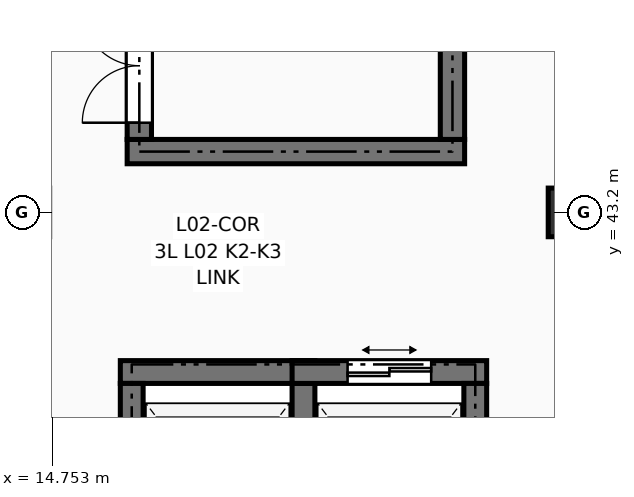
"""IFC4 building model, lengths in metres.
Left out: names, types, materials, properties, quantities, classifications, styles, units other than length and angle.
Written with IfcOpenShell. Run it as: python <this file> out.ifc"""

import sys

from ifc_helpers import new_model, si_unit, direction, frame, frame_2d, origin, origin_2d, place, context, subcontext, project, spatial, rectangle, extrude, element, fill, save


model = new_model("IFC4")
c1 = context("Model", 3, precision=1e-05, world=origin(), true_north=direction((0.0, 1.0)))
c2 = subcontext(c1, "Body", "Model", "MODEL_VIEW")
j1 = project(units=[si_unit("LENGTHUNIT", "METRE"), si_unit("PLANEANGLEUNIT", "RADIAN")], contexts=[c1])
p1 = place(None, origin())
s1 = spatial("IfcSite", under=j1, at=p1, CompositionType="ELEMENT")
p2 = place(p1, origin())
s2 = spatial("IfcBuilding", under=s1, at=p2, CompositionType="ELEMENT")
p3 = place(p2, frame((0.0, 0.0, 8.55)))
s3 = spatial("IfcBuildingStorey", under=s2, at=p3, CompositionType="ELEMENT", Elevation=8.55)
p4 = place(p3, frame((21.6, 43.2, 0.0), z_axis=(0.0, 0.0, 1.0), x_axis=(1.0, 0.0, 0.0)))
e1 = element("IfcColumn", 1, at=p4, inside=s3, PredefinedType="COLUMN", context=c2, shape_type="SweptSolid", body=[
    extrude(rectangle(XDim=0.64, YDim=0.64, at=origin_2d()), origin(), (0.0, 0.0, 1.0), 3.6),
])
p5 = place(p3, frame((15.74, 44.0, 0.0), z_axis=(0.0, 0.0, 1.0), x_axis=(1.0, 0.0, 0.0)))
e2 = element("IfcWall", 2, at=p5, inside=s3, PredefinedType="SHEAR", context=c2, shape_type="SweptSolid", body=[
    extrude(rectangle(XDim=4.44, YDim=0.32, at=frame_2d((2.22, 0.0))), origin(), (0.0, 0.0, 1.0), 3.39),
])
p6 = place(p3, frame((15.9, 44.16, 0.0), z_axis=(0.0, 0.0, 1.0), x_axis=(0.0, 1.0, 0.0)))
e3 = element("IfcWall", 3, at=p6, inside=s3, PredefinedType="SHEAR", context=c2, shape_type="SweptSolid", body=[
    extrude(rectangle(XDim=7.28, YDim=0.32, at=frame_2d((3.64, 0.0))), origin(), (0.0, 0.0, 1.0), 3.39),
])
p7 = place(p6, frame((0.22, 0.0, 0.0)))
e4 = element("IfcOpeningElement", 4, at=p7, cuts=e3, PredefinedType="OPENING", context=c2, shape_type="SweptSolid", body=[
    extrude(rectangle(XDim=1.5, YDim=2.2, at=frame_2d((0.75, 1.1))), frame((0.0, 0.172, 0.0), z_axis=(0.0, -1.0, 0.0), x_axis=(1.0, 0.0, 0.0)), (0.0, 0.0, 1.0), 0.344),
])
p8 = place(p3, frame((20.02, 44.16, 0.0), z_axis=(0.0, 0.0, 1.0), x_axis=(0.0, 1.0, 0.0)))
e5 = element("IfcWall", 5, at=p8, inside=s3, PredefinedType="SHEAR", context=c2, shape_type="SweptSolid", body=[
    extrude(rectangle(XDim=7.28, YDim=0.32, at=frame_2d((3.64, 0.0))), origin(), (0.0, 0.0, 1.0), 3.39),
])
p9 = place(p3, frame((15.65, 41.1, 0.0), z_axis=(0.0, 0.0, 1.0), x_axis=(1.0, 0.0, 0.0)))
e6 = element("IfcWall", 6, at=p9, inside=s3, PredefinedType="SHEAR", context=c2, shape_type="SweptSolid", body=[
    extrude(rectangle(XDim=2.56, YDim=0.3, at=frame_2d((1.28, 0.0))), origin(), (0.0, 0.0, 1.0), 3.39),
])
p10 = place(p3, frame((15.8, 37.98, 0.0), z_axis=(0.0, 0.0, 1.0), x_axis=(0.0, 1.0, 0.0)))
e7 = element("IfcWall", 7, at=p10, inside=s3, PredefinedType="SHEAR", context=c2, shape_type="SweptSolid", body=[
    extrude(rectangle(XDim=2.97, YDim=0.3, at=frame_2d((1.485, 0.0))), origin(), (0.0, 0.0, 1.0), 3.39),
])
p11 = place(p10, frame((0.935, 0.0, 0.0)))
e8 = element("IfcOpeningElement", 8, at=p11, cuts=e7, PredefinedType="OPENING", context=c2, shape_type="SweptSolid", body=[
    extrude(rectangle(XDim=1.1, YDim=2.2, at=frame_2d((0.55, 1.1))), frame((0.0, 0.162, 0.0), z_axis=(0.0, -1.0, 0.0), x_axis=(1.0, 0.0, 0.0)), (0.0, 0.0, 1.0), 0.324),
])
p12 = place(p3, frame((18.06, 37.98, 0.0), z_axis=(0.0, 0.0, 1.0), x_axis=(0.0, 1.0, 0.0)))
e9 = element("IfcWall", 9, at=p12, inside=s3, PredefinedType="SHEAR", context=c2, shape_type="SweptSolid", body=[
    extrude(rectangle(XDim=2.97, YDim=0.3, at=frame_2d((1.485, 0.0))), origin(), (0.0, 0.0, 1.0), 3.39),
])
p13 = place(p3, frame((17.91, 41.1, 0.0), z_axis=(0.0, 0.0, 1.0), x_axis=(1.0, 0.0, 0.0)))
e10 = element("IfcWall", 10, at=p13, inside=s3, PredefinedType="SHEAR", context=c2, shape_type="SweptSolid", body=[
    extrude(rectangle(XDim=2.56, YDim=0.3, at=frame_2d((1.28, 0.0))), origin(), (0.0, 0.0, 1.0), 3.39),
])
p14 = place(p13, frame((0.73, 0.0, 0.0)))
e11 = element("IfcOpeningElement", 11, at=p14, cuts=e10, PredefinedType="OPENING", context=c2, shape_type="SweptSolid", body=[
    extrude(rectangle(XDim=1.1, YDim=2.2, at=frame_2d((0.55, 1.1))), frame((0.0, 0.162, 0.0), z_axis=(0.0, -1.0, 0.0), x_axis=(1.0, 0.0, 0.0)), (0.0, 0.0, 1.0), 0.324),
])
p15 = place(p3, frame((20.32, 37.98, 0.0), z_axis=(0.0, 0.0, 1.0), x_axis=(0.0, 1.0, 0.0)))
e12 = element("IfcWall", 12, at=p15, inside=s3, PredefinedType="SHEAR", context=c2, shape_type="SweptSolid", body=[
    extrude(rectangle(XDim=2.97, YDim=0.3, at=frame_2d((1.485, 0.0))), origin(), (0.0, 0.0, 1.0), 3.39),
])
p16 = place(p7, origin())
e13 = element("IfcDoor", 13, at=p16, inside=s3, OperationType="DOUBLE_DOOR_SINGLE_SWING", PredefinedType="DOOR", context=c2, shape_type="SweptSolid", body=[
    extrude(rectangle(XDim=1.5, YDim=2.2, at=frame_2d((0.75, 1.1))), frame((0.0, 0.025, 0.0), z_axis=(0.0, -1.0, 0.0), x_axis=(1.0, 0.0, 0.0)), (0.0, 0.0, 1.0), 0.05),
])
fill(e4, e13)
p17 = place(p14, origin())
e14 = element("IfcDoor", 14, at=p17, inside=s3, OperationType="DOUBLE_DOOR_SLIDING", PredefinedType="DOOR", context=c2, shape_type="SweptSolid", body=[
    extrude(rectangle(XDim=1.1, YDim=2.2, at=frame_2d((0.55, 1.1))), frame((0.0, 0.025, 0.0), z_axis=(0.0, -1.0, 0.0), x_axis=(1.0, 0.0, 0.0)), (0.0, 0.0, 1.0), 0.05),
])
fill(e11, e14)
save(model, sys.argv[1])
